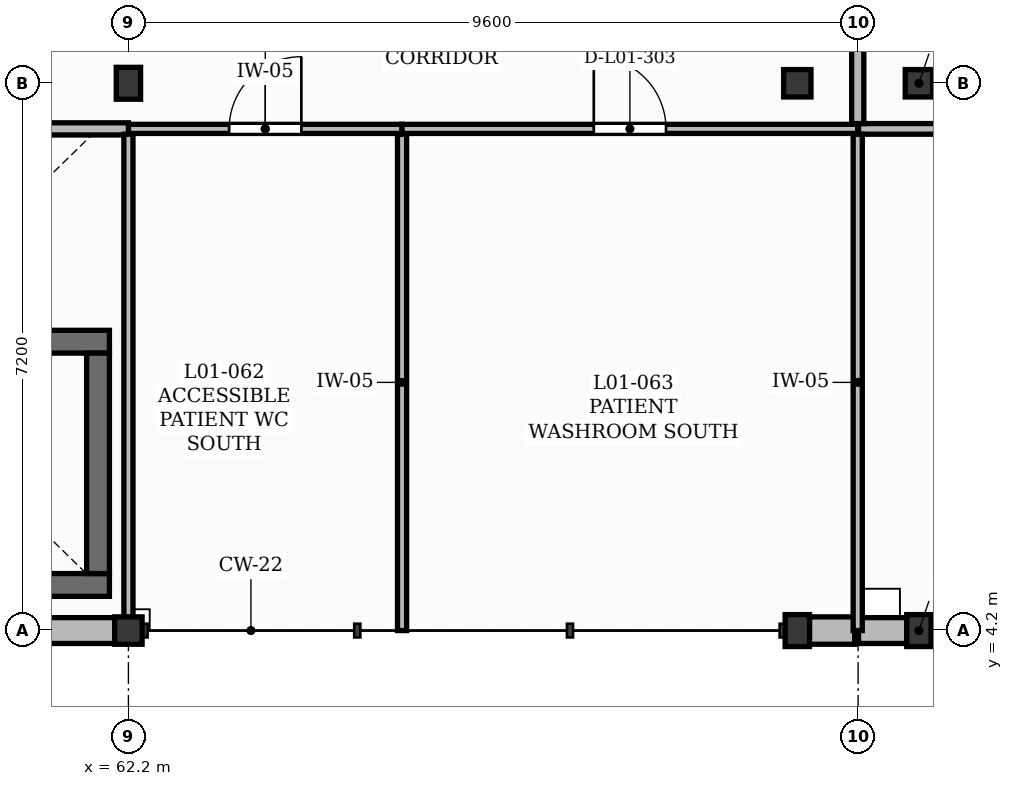
"""IFC4 building model, lengths in metres.
Left out: names, types, materials, properties, quantities, classifications, styles, units other than length and angle.
Written with IfcOpenShell. Run it as: python <this file> out.ifc"""

import sys

from ifc_helpers import new_model, si_unit, direction, frame, frame_2d, origin, origin_2d, place, context, subcontext, project, spatial, rectangle, extrude, element, fill, save


model = new_model("IFC4")
c1 = context("Model", 3, precision=1e-05, world=origin(), true_north=direction((0.0, 1.0)))
c2 = subcontext(c1, "Body", "Model", "MODEL_VIEW")
j1 = project(units=[si_unit("LENGTHUNIT", "METRE"), si_unit("PLANEANGLEUNIT", "RADIAN")], contexts=[c1])
p1 = place(None, origin())
s1 = spatial("IfcSite", under=j1, at=p1, CompositionType="ELEMENT")
p2 = place(p1, origin())
s2 = spatial("IfcBuilding", under=s1, at=p2, CompositionType="ELEMENT")
p3 = place(p2, frame((0.0, 0.0, 4.5)))
s3 = spatial("IfcBuildingStorey", under=s2, at=p3, CompositionType="ELEMENT", Elevation=4.5)
p4 = place(p3, frame((72.6, 4.2, 0.0), z_axis=(0.0, 0.0, 1.0), x_axis=(1.0, 0.0, 0.0)))
e1 = element("IfcColumn", 1, at=p4, inside=s3, PredefinedType="COLUMN", context=c2, shape_type="SweptSolid", body=[
    extrude(rectangle(XDim=0.32, YDim=0.42, at=origin_2d()), origin(), (0.0, 0.0, 1.0), 4.26),
])
for number, where, z_axis, x_axis in (
    (2, (72.6, 11.4, 0.0), (0.0, 0.0, 1.0), (1.0, 0.0, 0.0)),
    (3, (62.2, 4.2, 0.0), (0.0, 0.0, 1.0), (1.0, 0.0, 0.0)),
):
    element("IfcColumn", number, at=place(p3, frame(where, z_axis=z_axis, x_axis=x_axis)), inside=s3, PredefinedType="COLUMN", context=c2, shape_type="SweptSolid", body=[
        extrude(rectangle(XDim=0.36, YDim=0.36, at=origin_2d()), origin(), (0.0, 0.0, 1.0), 4.26),
    ])
for number, where, z_axis, x_axis in (
    (4, (62.2, 11.4, 0.0), (0.0, 0.0, 1.0), (1.0, 0.0, 0.0)),
    (5, (71.0, 4.2, 0.0), (0.0, 0.0, 1.0), (1.0, 0.0, 0.0)),
):
    element("IfcColumn", number, at=place(p3, frame(where, z_axis=z_axis, x_axis=x_axis)), inside=s3, PredefinedType="COLUMN", context=c2, shape_type="SweptSolid", body=[
        extrude(rectangle(XDim=0.32, YDim=0.42, at=origin_2d()), origin(), (0.0, 0.0, 1.0), 4.26),
    ])
p5 = place(p3, frame((71.0, 11.4, 0.0), z_axis=(0.0, 0.0, 1.0), x_axis=(1.0, 0.0, 0.0)))
e6 = element("IfcColumn", 6, at=p5, inside=s3, PredefinedType="COLUMN", context=c2, shape_type="SweptSolid", body=[
    extrude(rectangle(XDim=0.36, YDim=0.36, at=origin_2d()), origin(), (0.0, 0.0, 1.0), 4.26),
])
p6 = place(p3, frame((58.72, 4.2, 0.0), z_axis=(0.0, 0.0, 1.0), x_axis=(1.0, 0.0, 0.0)))
e7 = element("IfcWall", 7, at=p6, inside=s3, PredefinedType="SOLIDWALL", context=c2, shape_type="SweptSolid", body=[
    extrude(rectangle(XDim=3.3, YDim=0.34, at=frame_2d((1.65, 0.0))), origin(), (0.0, 0.0, 1.0), 3.8),
])
p7 = place(p3, frame((71.16, 4.2, 0.0), z_axis=(0.0, 0.0, 1.0), x_axis=(1.0, 0.0, 0.0)))
e8 = element("IfcWall", 8, at=p7, inside=s3, PredefinedType="SOLIDWALL", context=c2, shape_type="SweptSolid", body=[
    extrude(rectangle(XDim=0.595, YDim=0.36, at=frame_2d((0.297, 0.0))), origin(), (0.0, 0.0, 1.0), 4.26),
])
p8 = place(p3, frame((71.805, 4.2, 0.0), z_axis=(0.0, 0.0, 1.0), x_axis=(1.0, 0.0, 0.0)))
e9 = element("IfcWall", 9, at=p8, inside=s3, PredefinedType="SOLIDWALL", context=c2, shape_type="SweptSolid", body=[
    extrude(rectangle(XDim=0.635, YDim=0.34, at=frame_2d((0.317, 0.0))), origin(), (0.0, 0.0, 1.0), 4.26),
])
for number, where, z_axis, x_axis in (
    (10, (55.25, 4.8, 0.0), (0.0, 0.0, 1.0), (1.0, 0.0, 0.0)),
    (11, (55.25, 8.0, 0.0), (0.0, 0.0, 1.0), (1.0, 0.0, 0.0)),
):
    element("IfcWall", number, at=place(p3, frame(where, z_axis=z_axis, x_axis=x_axis)), inside=s3, PredefinedType="SHEAR", context=c2, shape_type="SweptSolid", body=[
        extrude(rectangle(XDim=6.7, YDim=0.3, at=frame_2d((3.35, 0.0))), origin(), (0.0, 0.0, 1.0), 4.25),
    ])
p9 = place(p3, frame((61.8, 4.95, 0.0), z_axis=(0.0, 0.0, 1.0), x_axis=(0.0, 1.0, 0.0)))
e12 = element("IfcWall", 12, at=p9, inside=s3, PredefinedType="SHEAR", context=c2, shape_type="SweptSolid", body=[
    extrude(rectangle(XDim=2.9, YDim=0.3, at=frame_2d((1.45, 0.0))), origin(), (0.0, 0.0, 1.0), 4.25),
])
p10 = place(p3, frame((62.2, 10.8, 0.0), z_axis=(0.0, 0.0, 1.0), x_axis=(1.0, 0.0, 0.0)))
e13 = element("IfcWall", 13, at=p10, inside=s3, PredefinedType="PLUMBINGWALL", context=c2, shape_type="SweptSolid", body=[
    extrude(rectangle(XDim=3.6, YDim=0.12, at=frame_2d((1.8, 0.0))), origin(), (0.0, 0.0, 1.0), 4.18),
])
p11 = place(p10, frame((1.325, 0.0, 0.0)))
e14 = element("IfcOpeningElement", 14, at=p11, cuts=e13, PredefinedType="OPENING", context=c2, shape_type="SweptSolid", body=[
    extrude(rectangle(XDim=0.95, YDim=2.1, at=frame_2d((0.475, 1.05))), frame((0.0, 0.07, 0.0), z_axis=(0.0, -1.0, 0.0), x_axis=(1.0, 0.0, 0.0)), (0.0, 0.0, 1.0), 0.14),
])
p12 = place(p3, frame((65.8, 4.2, 0.0), z_axis=(0.0, 0.0, 1.0), x_axis=(0.0, 1.0, 0.0)))
e15 = element("IfcWall", 15, at=p12, inside=s3, PredefinedType="PLUMBINGWALL", context=c2, shape_type="SweptSolid", body=[
    extrude(rectangle(XDim=6.53, YDim=0.12, at=frame_2d((3.265, 0.0))), origin(), (0.0, 0.0, 1.0), 4.18),
])
p13 = place(p3, frame((65.8, 10.8, 0.0), z_axis=(0.0, 0.0, 1.0), x_axis=(1.0, 0.0, 0.0)))
e16 = element("IfcWall", 16, at=p13, inside=s3, PredefinedType="PLUMBINGWALL", context=c2, shape_type="SweptSolid", body=[
    extrude(rectangle(XDim=5.995, YDim=0.12, at=frame_2d((2.998, 0.0))), origin(), (0.0, 0.0, 1.0), 4.18),
])
p14 = place(p13, frame((2.522, 0.0, 0.0)))
e17 = element("IfcOpeningElement", 17, at=p14, cuts=e16, PredefinedType="OPENING", context=c2, shape_type="SweptSolid", body=[
    extrude(rectangle(XDim=0.95, YDim=2.1, at=frame_2d((0.475, 1.05))), frame((0.0, 0.07, 0.0), z_axis=(0.0, -1.0, 0.0), x_axis=(1.0, 0.0, 0.0)), (0.0, 0.0, 1.0), 0.14),
])
p15 = place(p3, frame((71.805, 10.8, 0.0), z_axis=(0.0, 0.0, 1.0), x_axis=(1.0, 0.0, 0.0)))
e18 = element("IfcWall", 18, at=p15, inside=s3, PredefinedType="PARTITIONING", context=c2, shape_type="SweptSolid", body=[
    extrude(rectangle(XDim=6.438, YDim=0.14, at=frame_2d((3.219, 0.0))), origin(), (0.0, 0.0, 1.0), 4.18),
])
p16 = place(p15, frame((2.699, 0.0, 0.0)))
e19 = element("IfcOpeningElement", 19, at=p16, cuts=e18, PredefinedType="OPENING", context=c2, shape_type="SweptSolid", body=[
    extrude(rectangle(XDim=1.04, YDim=2.1, at=frame_2d((0.52, 1.05))), frame((0.0, 0.08, 0.0), z_axis=(0.0, -1.0, 0.0), x_axis=(1.0, 0.0, 0.0)), (0.0, 0.0, 1.0), 0.16),
])
p17 = place(p3, frame((59.4, 10.8, 0.0), z_axis=(0.0, 0.0, 1.0), x_axis=(1.0, 0.0, 0.0)))
e20 = element("IfcWall", 20, at=p17, inside=s3, PredefinedType="PARTITIONING", context=c2, shape_type="SweptSolid", body=[
    extrude(rectangle(XDim=2.8, YDim=0.16, at=frame_2d((1.4, 0.0))), origin(), (0.0, 0.0, 1.0), 4.18),
])
p18 = place(p3, frame((71.795, 10.87, 0.0), z_axis=(0.0, 0.0, 1.0), x_axis=(0.0, 1.0, 0.0)))
e21 = element("IfcWall", 21, at=p18, inside=s3, PredefinedType="PARTITIONING", context=c2, shape_type="SweptSolid", body=[
    extrude(rectangle(XDim=2.46, YDim=0.16, at=frame_2d((1.23, 0.0))), origin(), (0.0, 0.0, 1.0), 4.18),
])
p19 = place(p3, frame((62.2, 4.38, 0.0), z_axis=(0.0, 0.0, 1.0), x_axis=(0.0, 1.0, 0.0)))
e22 = element("IfcWall", 22, at=p19, inside=s3, PredefinedType="PLUMBINGWALL", context=c2, shape_type="SweptSolid", body=[
    extrude(rectangle(XDim=6.35, YDim=0.12, at=frame_2d((3.175, 0.0))), origin(), (0.0, 0.0, 1.0), 3.74),
])
p20 = place(p3, frame((71.795, 4.2, 0.0), z_axis=(0.0, 0.0, 1.0), x_axis=(0.0, 1.0, 0.0)))
e23 = element("IfcWall", 23, at=p20, inside=s3, PredefinedType="PLUMBINGWALL", context=c2, shape_type="SweptSolid", body=[
    extrude(rectangle(XDim=6.53, YDim=0.12, at=frame_2d((3.265, 0.0))), origin(), (0.0, 0.0, 1.0), 4.18),
])
p21 = place(p11, origin())
e24 = element("IfcDoor", 24, at=p21, inside=s3, OperationType="SINGLE_SWING_RIGHT", PredefinedType="DOOR", context=c2, shape_type="SweptSolid", body=[
    extrude(rectangle(XDim=0.95, YDim=2.1, at=frame_2d((0.475, 1.05))), frame((0.0, 0.025, 0.0), z_axis=(0.0, -1.0, 0.0), x_axis=(1.0, 0.0, 0.0)), (0.0, 0.0, 1.0), 0.05),
])
fill(e14, e24)
p22 = place(p14, origin())
e25 = element("IfcDoor", 25, at=p22, inside=s3, OperationType="SINGLE_SWING_LEFT", PredefinedType="DOOR", context=c2, shape_type="SweptSolid", body=[
    extrude(rectangle(XDim=0.95, YDim=2.1, at=frame_2d((0.475, 1.05))), frame((0.0, 0.025, 0.0), z_axis=(0.0, -1.0, 0.0), x_axis=(1.0, 0.0, 0.0)), (0.0, 0.0, 1.0), 0.05),
])
fill(e17, e25)
save(model, sys.argv[1])
